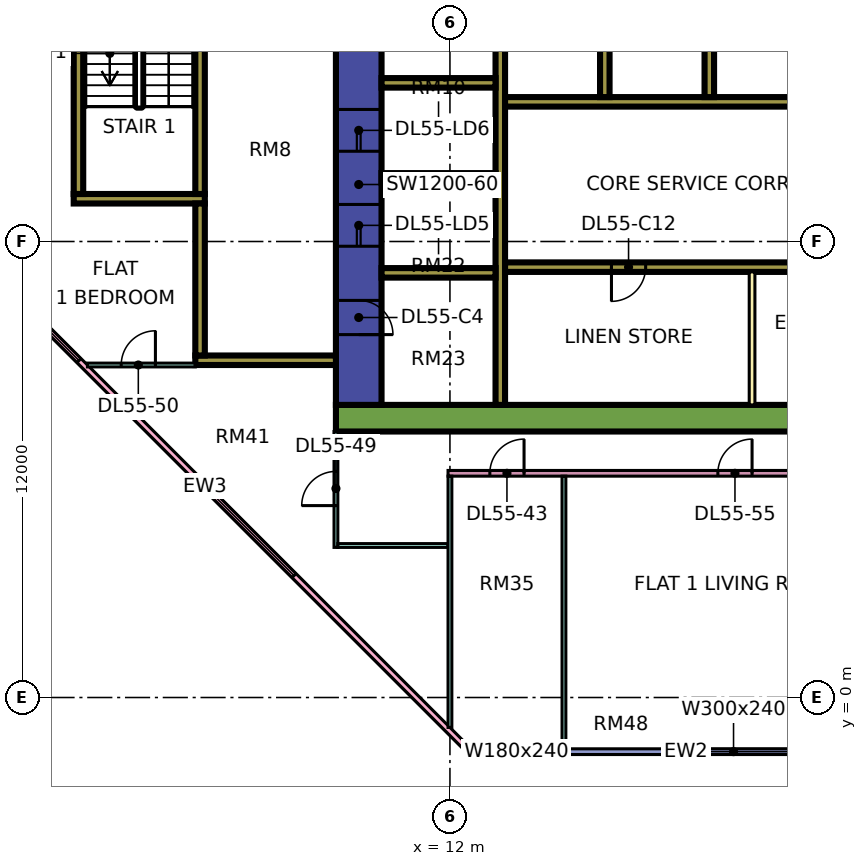
"""IFC4 building model, lengths in metres.
Left out: names, types, materials, properties, quantities, classifications, styles, units other than length and angle.
Written with IfcOpenShell. Run it as: python <this file> out.ifc"""

import sys

from ifc_helpers import new_model, si_unit, direction, frame, frame_2d, origin, place, context, subcontext, project, spatial, rectangle, extrude, element, fill, save


model = new_model("IFC4")
c1 = context("Model", 3, precision=1e-05, world=origin(), true_north=direction((0.0, 1.0)))
c2 = subcontext(c1, "Body", "Model", "MODEL_VIEW")
j1 = project(units=[si_unit("LENGTHUNIT", "METRE"), si_unit("PLANEANGLEUNIT", "RADIAN")], contexts=[c1])
p1 = place(None, origin())
s1 = spatial("IfcSite", under=j1, at=p1, CompositionType="ELEMENT")
p2 = place(p1, origin())
s2 = spatial("IfcBuilding", under=s1, at=p2, CompositionType="ELEMENT")
p3 = place(p2, frame((0.0, 0.0, 234.15)))
s3 = spatial("IfcBuildingStorey", under=s2, at=p3, CompositionType="ELEMENT", Elevation=234.15)
p4 = place(p3, frame((9.0, 7.35, 0.0), z_axis=(0.0, 0.0, 1.0), x_axis=(1.0, 0.0, 0.0)))
e1 = element("IfcWall", 1, at=p4, inside=s3, PredefinedType="SHEAR", context=c2, shape_type="SweptSolid", body=[
    extrude(rectangle(XDim=25.0, YDim=0.7, at=frame_2d((12.5, 0.0))), origin(), (0.0, 0.0, 1.0), 3.75),
])
p5 = place(p3, frame((9.6, 7.7, 0.0), z_axis=(0.0, 0.0, 1.0), x_axis=(0.0, 1.0, 0.0)))
e2 = element("IfcWall", 2, at=p5, inside=s3, PredefinedType="SHEAR", context=c2, shape_type="SweptSolid", body=[
    extrude(rectangle(XDim=11.6, YDim=1.2, at=frame_2d((5.8, 0.0))), origin(), (0.0, 0.0, 1.0), 3.75),
])
p6 = place(p5, frame((4.175, 0.0, 0.0)))
e3 = element("IfcOpeningElement", 3, at=p6, cuts=e2, PredefinedType="OPENING", context=c2, shape_type="SweptSolid", body=[
    extrude(rectangle(XDim=1.1, YDim=2.2, at=frame_2d((0.55, 1.1))), frame((0.0, 0.61, 0.0), z_axis=(0.0, -1.0, 0.0), x_axis=(1.0, 0.0, 0.0)), (0.0, 0.0, 1.0), 1.22),
])
p7 = place(p5, frame((6.675, 0.0, 0.0)))
e4 = element("IfcOpeningElement", 4, at=p7, cuts=e2, PredefinedType="OPENING", context=c2, shape_type="SweptSolid", body=[
    extrude(rectangle(XDim=1.1, YDim=2.2, at=frame_2d((0.55, 1.1))), frame((0.0, 0.61, 0.0), z_axis=(0.0, -1.0, 0.0), x_axis=(1.0, 0.0, 0.0)), (0.0, 0.0, 1.0), 1.22),
])
p8 = place(p5, frame((9.55, 0.0, 0.0)))
e5 = element("IfcOpeningElement", 5, at=p8, cuts=e2, PredefinedType="OPENING", context=c2, shape_type="SweptSolid", body=[
    extrude(rectangle(XDim=1.1, YDim=2.2, at=frame_2d((0.55, 1.1))), frame((0.0, 0.61, 0.0), z_axis=(0.0, -1.0, 0.0), x_axis=(1.0, 0.0, 0.0)), (0.0, 0.0, 1.0), 1.22),
])
p9 = place(p5, frame((1.85, 0.0, 0.0)))
e6 = element("IfcOpeningElement", 6, at=p9, cuts=e2, PredefinedType="OPENING", context=c2, shape_type="SweptSolid", body=[
    extrude(rectangle(XDim=0.9, YDim=2.1, at=frame_2d((0.45, 1.05))), frame((0.0, 0.61, 0.0), z_axis=(0.0, -1.0, 0.0), x_axis=(1.0, 0.0, 0.0)), (0.0, 0.0, 1.0), 1.22),
])
p10 = place(p3, frame((13.325, 7.7, 0.0), z_axis=(0.0, 0.0, 1.0), x_axis=(0.0, 1.0, 0.0)))
e7 = element("IfcWall", 7, at=p10, inside=s3, PredefinedType="SHEAR", context=c2, shape_type="SweptSolid", body=[
    extrude(rectangle(XDim=11.6, YDim=0.25, at=frame_2d((5.8, 0.0))), origin(), (0.0, 0.0, 1.0), 3.75),
])
p11 = place(p3, frame((13.45, 11.325, 0.0), z_axis=(0.0, 0.0, 1.0), x_axis=(1.0, 0.0, 0.0)))
e8 = element("IfcWall", 8, at=p11, inside=s3, PredefinedType="SHEAR", context=c2, shape_type="SweptSolid", body=[
    extrude(rectangle(XDim=19.85, YDim=0.25, at=frame_2d((9.925, 0.0))), origin(), (0.0, 0.0, 1.0), 3.75),
])
p12 = place(p11, frame((11.65, 0.0, 0.0)))
e9 = element("IfcOpeningElement", 9, at=p12, cuts=e8, PredefinedType="OPENING", context=c2, shape_type="SweptSolid", body=[
    extrude(rectangle(XDim=1.2, YDim=2.2, at=frame_2d((0.6, 1.1))), frame((0.0, 0.135, 0.0), z_axis=(0.0, -1.0, 0.0), x_axis=(1.0, 0.0, 0.0)), (0.0, 0.0, 1.0), 0.27),
])
p13 = place(p11, frame((14.4, 0.0, 0.0)))
e10 = element("IfcOpeningElement", 10, at=p13, cuts=e8, PredefinedType="OPENING", context=c2, shape_type="SweptSolid", body=[
    extrude(rectangle(XDim=1.2, YDim=2.2, at=frame_2d((0.6, 1.1))), frame((0.0, 0.135, 0.0), z_axis=(0.0, -1.0, 0.0), x_axis=(1.0, 0.0, 0.0)), (0.0, 0.0, 1.0), 0.27),
])
p14 = place(p11, frame((17.15, 0.0, 0.0)))
e11 = element("IfcOpeningElement", 11, at=p14, cuts=e8, PredefinedType="OPENING", context=c2, shape_type="SweptSolid", body=[
    extrude(rectangle(XDim=1.2, YDim=2.2, at=frame_2d((0.6, 1.1))), frame((0.0, 0.135, 0.0), z_axis=(0.0, -1.0, 0.0), x_axis=(1.0, 0.0, 0.0)), (0.0, 0.0, 1.0), 0.27),
])
p15 = place(p11, frame((2.8, 0.0, 0.0)))
e12 = element("IfcOpeningElement", 12, at=p15, cuts=e8, PredefinedType="OPENING", context=c2, shape_type="SweptSolid", body=[
    extrude(rectangle(XDim=0.9, YDim=2.1, at=frame_2d((0.45, 1.05))), frame((0.0, 0.135, 0.0), z_axis=(0.0, -1.0, 0.0), x_axis=(1.0, 0.0, 0.0)), (0.0, 0.0, 1.0), 0.27),
])
p16 = place(p11, frame((8.175, 0.0, 0.0)))
e13 = element("IfcOpeningElement", 13, at=p16, cuts=e8, PredefinedType="OPENING", context=c2, shape_type="SweptSolid", body=[
    extrude(rectangle(XDim=0.9, YDim=2.1, at=frame_2d((0.45, 1.05))), frame((0.0, 0.135, 0.0), z_axis=(0.0, -1.0, 0.0), x_axis=(1.0, 0.0, 0.0)), (0.0, 0.0, 1.0), 0.27),
])
p17 = place(p3, frame((13.45, 15.675, 0.0), z_axis=(0.0, 0.0, 1.0), x_axis=(1.0, 0.0, 0.0)))
e14 = element("IfcWall", 14, at=p17, inside=s3, PredefinedType="SHEAR", context=c2, shape_type="SweptSolid", body=[
    extrude(rectangle(XDim=13.75, YDim=0.25, at=frame_2d((6.875, 0.0))), origin(), (0.0, 0.0, 1.0), 3.75),
])
p18 = place(p17, frame((11.65, 0.0, 0.0)))
e15 = element("IfcOpeningElement", 15, at=p18, cuts=e14, PredefinedType="OPENING", context=c2, shape_type="SweptSolid", body=[
    extrude(rectangle(XDim=1.2, YDim=2.2, at=frame_2d((0.6, 1.1))), frame((0.0, 0.135, 0.0), z_axis=(0.0, -1.0, 0.0), x_axis=(1.0, 0.0, 0.0)), (0.0, 0.0, 1.0), 0.27),
])
for number, where, z_axis, x_axis in (
    (16, (10.2, 11.175, 0.0), (0.0, 0.0, 1.0), (1.0, 0.0, 0.0)),
    (17, (10.2, 13.675, 0.0), (0.0, 0.0, 1.0), (1.0, 0.0, 0.0)),
    (18, (10.2, 16.175, 0.0), (0.0, 0.0, 1.0), (1.0, 0.0, 0.0)),
):
    element("IfcWall", number, at=place(p3, frame(where, z_axis=z_axis, x_axis=x_axis)), inside=s3, PredefinedType="SHEAR", context=c2, shape_type="SweptSolid", body=[
        extrude(rectangle(XDim=3.0, YDim=0.25, at=frame_2d((1.5, 0.0))), origin(), (0.0, 0.0, 1.0), 3.75),
    ])
for number, where, z_axis, x_axis in (
    (19, (16.075, 15.8, 0.0), (0.0, 0.0, 1.0), (0.0, 1.0, 0.0)),
    (20, (18.825, 15.8, 0.0), (0.0, 0.0, 1.0), (0.0, 1.0, 0.0)),
):
    element("IfcWall", number, at=place(p3, frame(where, z_axis=z_axis, x_axis=x_axis)), inside=s3, PredefinedType="SHEAR", context=c2, shape_type="SweptSolid", body=[
        extrude(rectangle(XDim=3.5, YDim=0.25, at=frame_2d((1.75, 0.0))), origin(), (0.0, 0.0, 1.0), 3.75),
    ])
p19 = place(p3, frame((2.1, 13.125, 0.0), z_axis=(0.0, 0.0, 1.0), x_axis=(1.0, 0.0, 0.0)))
e21 = element("IfcWall", 21, at=p19, inside=s3, PredefinedType="SHEAR", context=c2, shape_type="SweptSolid", body=[
    extrude(rectangle(XDim=3.45, YDim=0.25, at=frame_2d((1.725, 0.0))), origin(), (0.0, 0.0, 1.0), 3.75),
])
p20 = place(p3, frame((2.225, 13.25, 0.0), z_axis=(0.0, 0.0, 1.0), x_axis=(0.0, 1.0, 0.0)))
e22 = element("IfcWall", 22, at=p20, inside=s3, PredefinedType="SHEAR", context=c2, shape_type="SweptSolid", body=[
    extrude(rectangle(XDim=6.5, YDim=0.25, at=frame_2d((3.25, 0.0))), origin(), (0.0, 0.0, 1.0), 3.75),
])
p21 = place(p3, frame((5.425, 13.25, 0.0), z_axis=(0.0, 0.0, 1.0), x_axis=(0.0, 1.0, 0.0)))
e23 = element("IfcWall", 23, at=p21, inside=s3, PredefinedType="SHEAR", context=c2, shape_type="SweptSolid", body=[
    extrude(rectangle(XDim=6.5, YDim=0.25, at=frame_2d((3.25, 0.0))), origin(), (0.0, 0.0, 1.0), 3.75),
])
p22 = place(p21, frame((5.25, 0.0, 0.0)))
e24 = element("IfcOpeningElement", 24, at=p22, cuts=e23, PredefinedType="OPENING", context=c2, shape_type="SweptSolid", body=[
    extrude(rectangle(XDim=1.1, YDim=2.2, at=frame_2d((0.55, 1.1))), frame((0.0, 0.135, 0.0), z_axis=(0.0, -1.0, 0.0), x_axis=(1.0, 0.0, 0.0)), (0.0, 0.0, 1.0), 0.27),
])
p23 = place(p3, frame((5.3, 8.875, 0.0), z_axis=(0.0, 0.0, 1.0), x_axis=(1.0, 0.0, 0.0)))
e25 = element("IfcWall", 25, at=p23, inside=s3, PredefinedType="SHEAR", context=c2, shape_type="SweptSolid", body=[
    extrude(rectangle(XDim=3.7, YDim=0.25, at=frame_2d((1.85, 0.0))), origin(), (0.0, 0.0, 1.0), 3.75),
])
p24 = place(p3, frame((5.425, 9.0, 0.0), z_axis=(0.0, 0.0, 1.0), x_axis=(0.0, 1.0, 0.0)))
e26 = element("IfcWall", 26, at=p24, inside=s3, PredefinedType="SHEAR", context=c2, shape_type="SweptSolid", body=[
    extrude(rectangle(XDim=4.0, YDim=0.25, at=frame_2d((2.0, 0.0))), origin(), (0.0, 0.0, 1.0), 3.75),
])
p25 = place(p3, frame((-1.447, 12.553, 0.0), z_axis=(0.0, 0.0, 1.0), x_axis=(0.707106781187, -0.707106781187, 0.0)))
e27 = element("IfcWall", 27, at=p25, inside=s3, PredefinedType="SOLIDWALL", context=c2, shape_type="SweptSolid", body=[
    extrude(rectangle(XDim=19.799, YDim=0.15, at=frame_2d((9.899, 0.0))), origin(), (0.0, 0.0, 1.0), 3.35),
])
p26 = place(p25, frame((2.212, 0.0, 0.45)))
e28 = element("IfcOpeningElement", 28, at=p26, cuts=e27, PredefinedType="OPENING", context=c2, shape_type="SweptSolid", body=[
    extrude(rectangle(XDim=3.0, YDim=2.4, at=frame_2d((1.5, 1.2))), frame((0.0, 0.085, 0.0), z_axis=(0.0, -1.0, 0.0), x_axis=(1.0, 0.0, 0.0)), (0.0, 0.0, 1.0), 0.17),
])
p27 = place(p25, frame((10.216, 0.0, 0.45)))
e29 = element("IfcOpeningElement", 29, at=p27, cuts=e27, PredefinedType="OPENING", context=c2, shape_type="SweptSolid", body=[
    extrude(rectangle(XDim=3.0, YDim=2.4, at=frame_2d((1.5, 1.2))), frame((0.0, 0.085, 0.0), z_axis=(0.0, -1.0, 0.0), x_axis=(1.0, 0.0, 0.0)), (0.0, 0.0, 1.0), 0.17),
])
p28 = place(p3, frame((12.5, -1.425, 0.0), z_axis=(0.0, 0.0, 1.0), x_axis=(1.0, 0.0, 0.0)))
e30 = element("IfcWall", 30, at=p28, inside=s3, PredefinedType="SOLIDWALL", context=c2, shape_type="SweptSolid", body=[
    extrude(rectangle(XDim=11.425, YDim=0.15, at=frame_2d((5.712, 0.0))), origin(), (0.0, 0.0, 1.0), 3.35),
])
p29 = place(p28, frame((0.35, 0.0, 0.45)))
e31 = element("IfcOpeningElement", 31, at=p29, cuts=e30, PredefinedType="OPENING", context=c2, shape_type="SweptSolid", body=[
    extrude(rectangle(XDim=1.8, YDim=2.4, at=frame_2d((0.9, 1.2))), frame((0.0, 0.085, 0.0), z_axis=(0.0, -1.0, 0.0), x_axis=(1.0, 0.0, 0.0)), (0.0, 0.0, 1.0), 0.17),
])
p30 = place(p28, frame((5.462, 0.0, 0.45)))
e32 = element("IfcOpeningElement", 32, at=p30, cuts=e30, PredefinedType="OPENING", context=c2, shape_type="SweptSolid", body=[
    extrude(rectangle(XDim=3.0, YDim=2.4, at=frame_2d((1.5, 1.2))), frame((0.0, 0.085, 0.0), z_axis=(0.0, -1.0, 0.0), x_axis=(1.0, 0.0, 0.0)), (0.0, 0.0, 1.0), 0.17),
])
p31 = place(p3, frame((19.95, 7.7, 0.0), z_axis=(0.0, 0.0, 1.0), x_axis=(0.0, 1.0, 0.0)))
e33 = element("IfcWall", 33, at=p31, inside=s3, PredefinedType="PARTITIONING", context=c2, shape_type="SweptSolid", body=[
    extrude(rectangle(XDim=3.5, YDim=0.15, at=frame_2d((1.75, 0.0))), origin(), (0.0, 0.0, 1.0), 3.35),
])
p32 = place(p3, frame((2.461, 8.75, 0.0), z_axis=(0.0, 0.0, 1.0), x_axis=(1.0, 0.0, 0.0)))
e34 = element("IfcWall", 34, at=p32, inside=s3, PredefinedType="PARTITIONING", context=c2, shape_type="SweptSolid", body=[
    extrude(rectangle(XDim=2.839, YDim=0.1, at=frame_2d((1.419, 0.0))), origin(), (0.0, 0.0, 1.0), 3.35),
])
p33 = place(p32, frame((0.889, 0.0, 0.0)))
e35 = element("IfcOpeningElement", 35, at=p33, cuts=e34, PredefinedType="OPENING", context=c2, shape_type="SweptSolid", body=[
    extrude(rectangle(XDim=0.9, YDim=2.1, at=frame_2d((0.45, 1.05))), frame((0.0, 0.06, 0.0), z_axis=(0.0, -1.0, 0.0), x_axis=(1.0, 0.0, 0.0)), (0.0, 0.0, 1.0), 0.12),
])
p34 = place(p3, frame((9.0, 3.95, 0.0), z_axis=(0.0, 0.0, 1.0), x_axis=(0.0, 1.0, 0.0)))
e36 = element("IfcWall", 36, at=p34, inside=s3, PredefinedType="PARTITIONING", context=c2, shape_type="SweptSolid", body=[
    extrude(rectangle(XDim=3.05, YDim=0.1, at=frame_2d((1.525, 0.0))), origin(), (0.0, 0.0, 1.0), 3.35),
])
p35 = place(p34, frame((1.1, 0.0, 0.0)))
e37 = element("IfcOpeningElement", 37, at=p35, cuts=e36, PredefinedType="OPENING", context=c2, shape_type="SweptSolid", body=[
    extrude(rectangle(XDim=0.9, YDim=2.1, at=frame_2d((0.45, 1.05))), frame((0.0, 0.06, 0.0), z_axis=(0.0, -1.0, 0.0), x_axis=(1.0, 0.0, 0.0)), (0.0, 0.0, 1.0), 0.12),
])
p36 = place(p3, frame((9.05, 4.0, 0.0), z_axis=(0.0, 0.0, 1.0), x_axis=(1.0, 0.0, 0.0)))
e38 = element("IfcWall", 38, at=p36, inside=s3, PredefinedType="PARTITIONING", context=c2, shape_type="SweptSolid", body=[
    extrude(rectangle(XDim=2.9, YDim=0.1, at=frame_2d((1.45, 0.0))), origin(), (0.0, 0.0, 1.0), 3.35),
])
p37 = place(p3, frame((11.95, 5.9, 0.0), z_axis=(0.0, 0.0, 1.0), x_axis=(1.0, 0.0, 0.0)))
e39 = element("IfcWall", 39, at=p37, inside=s3, PredefinedType="PARTITIONING", context=c2, shape_type="SweptSolid", body=[
    extrude(rectangle(XDim=21.1, YDim=0.15, at=frame_2d((10.55, 0.0))), origin(), (0.0, 0.0, 1.0), 3.35),
])
p38 = place(p37, frame((1.1, 0.0, 0.0)))
e40 = element("IfcOpeningElement", 40, at=p38, cuts=e39, PredefinedType="OPENING", context=c2, shape_type="SweptSolid", body=[
    extrude(rectangle(XDim=0.9, YDim=2.1, at=frame_2d((0.45, 1.05))), frame((0.0, 0.085, 0.0), z_axis=(0.0, -1.0, 0.0), x_axis=(1.0, 0.0, 0.0)), (0.0, 0.0, 1.0), 0.17),
])
p39 = place(p37, frame((13.1, 0.0, 0.0)))
e41 = element("IfcOpeningElement", 41, at=p39, cuts=e39, PredefinedType="OPENING", context=c2, shape_type="SweptSolid", body=[
    extrude(rectangle(XDim=0.9, YDim=2.1, at=frame_2d((0.45, 1.05))), frame((0.0, 0.085, 0.0), z_axis=(0.0, -1.0, 0.0), x_axis=(1.0, 0.0, 0.0)), (0.0, 0.0, 1.0), 0.17),
])
p40 = place(p37, frame((7.1, 0.0, 0.0)))
e42 = element("IfcOpeningElement", 42, at=p40, cuts=e39, PredefinedType="OPENING", context=c2, shape_type="SweptSolid", body=[
    extrude(rectangle(XDim=0.9, YDim=2.1, at=frame_2d((0.45, 1.05))), frame((0.0, 0.085, 0.0), z_axis=(0.0, -1.0, 0.0), x_axis=(1.0, 0.0, 0.0)), (0.0, 0.0, 1.0), 0.17),
])
p41 = place(p3, frame((12.0, -0.788, 0.0), z_axis=(0.0, 0.0, 1.0), x_axis=(0.0, 1.0, 0.0)))
e43 = element("IfcWall", 43, at=p41, inside=s3, PredefinedType="PARTITIONING", context=c2, shape_type="SweptSolid", body=[
    extrude(rectangle(XDim=6.613, YDim=0.1, at=frame_2d((3.306, 0.0))), origin(), (0.0, 0.0, 1.0), 3.35),
])
p42 = place(p3, frame((15.0, -1.35, 0.0), z_axis=(0.0, 0.0, 1.0), x_axis=(0.0, 1.0, 0.0)))
e44 = element("IfcWall", 44, at=p42, inside=s3, PredefinedType="PARTITIONING", context=c2, shape_type="SweptSolid", body=[
    extrude(rectangle(XDim=7.175, YDim=0.1, at=frame_2d((3.587, 0.0))), origin(), (0.0, 0.0, 1.0), 3.35),
])
p43 = place(p26, origin())
e45 = element("IfcWindow", 45, at=p43, inside=s3, PartitioningType="SINGLE_PANEL", PredefinedType="WINDOW", context=c2, shape_type="SweptSolid", body=[
    extrude(rectangle(XDim=3.0, YDim=2.4, at=frame_2d((1.5, 1.2))), frame((0.0, 0.03, 0.0), z_axis=(0.0, -1.0, 0.0), x_axis=(1.0, 0.0, 0.0)), (0.0, 0.0, 1.0), 0.06),
])
fill(e28, e45)
p44 = place(p27, origin())
e46 = element("IfcWindow", 46, at=p44, inside=s3, PartitioningType="SINGLE_PANEL", PredefinedType="WINDOW", context=c2, shape_type="SweptSolid", body=[
    extrude(rectangle(XDim=3.0, YDim=2.4, at=frame_2d((1.5, 1.2))), frame((0.0, 0.03, 0.0), z_axis=(0.0, -1.0, 0.0), x_axis=(1.0, 0.0, 0.0)), (0.0, 0.0, 1.0), 0.06),
])
fill(e29, e46)
p45 = place(p29, origin())
e47 = element("IfcWindow", 47, at=p45, inside=s3, PartitioningType="SINGLE_PANEL", PredefinedType="WINDOW", context=c2, shape_type="SweptSolid", body=[
    extrude(rectangle(XDim=1.8, YDim=2.4, at=frame_2d((0.9, 1.2))), frame((0.0, 0.03, 0.0), z_axis=(0.0, -1.0, 0.0), x_axis=(1.0, 0.0, 0.0)), (0.0, 0.0, 1.0), 0.06),
])
fill(e31, e47)
p46 = place(p30, origin())
e48 = element("IfcWindow", 48, at=p46, inside=s3, PartitioningType="SINGLE_PANEL", PredefinedType="WINDOW", context=c2, shape_type="SweptSolid", body=[
    extrude(rectangle(XDim=3.0, YDim=2.4, at=frame_2d((1.5, 1.2))), frame((0.0, 0.03, 0.0), z_axis=(0.0, -1.0, 0.0), x_axis=(1.0, 0.0, 0.0)), (0.0, 0.0, 1.0), 0.06),
])
fill(e32, e48)
p47 = place(p6, origin())
e49 = element("IfcDoor", 49, at=p47, inside=s3, OperationType="DOUBLE_DOOR_SLIDING", PredefinedType="DOOR", context=c2, shape_type="SweptSolid", body=[
    extrude(rectangle(XDim=1.1, YDim=2.2, at=frame_2d((0.55, 1.1))), frame((0.0, 0.025, 0.0), z_axis=(0.0, -1.0, 0.0), x_axis=(1.0, 0.0, 0.0)), (0.0, 0.0, 1.0), 0.05),
])
fill(e3, e49)
p48 = place(p7, origin())
e50 = element("IfcDoor", 50, at=p48, inside=s3, OperationType="DOUBLE_DOOR_SLIDING", PredefinedType="DOOR", context=c2, shape_type="SweptSolid", body=[
    extrude(rectangle(XDim=1.1, YDim=2.2, at=frame_2d((0.55, 1.1))), frame((0.0, 0.025, 0.0), z_axis=(0.0, -1.0, 0.0), x_axis=(1.0, 0.0, 0.0)), (0.0, 0.0, 1.0), 0.05),
])
fill(e4, e50)
p49 = place(p9, frame((0.9, 0.0, 0.0), z_axis=(0.0, 0.0, 1.0), x_axis=(-1.0, 0.0, 0.0)))
e51 = element("IfcDoor", 51, at=p49, inside=s3, OperationType="SINGLE_SWING_LEFT", PredefinedType="DOOR", context=c2, shape_type="SweptSolid", body=[
    extrude(rectangle(XDim=0.9, YDim=2.1, at=frame_2d((0.45, 1.05))), frame((0.0, 0.025, 0.0), z_axis=(0.0, -1.0, 0.0), x_axis=(1.0, 0.0, 0.0)), (0.0, 0.0, 1.0), 0.05),
])
fill(e6, e51)
p50 = place(p15, frame((0.9, 0.0, 0.0), z_axis=(0.0, 0.0, 1.0), x_axis=(-1.0, 0.0, 0.0)))
e52 = element("IfcDoor", 52, at=p50, inside=s3, OperationType="SINGLE_SWING_LEFT", PredefinedType="DOOR", context=c2, shape_type="SweptSolid", body=[
    extrude(rectangle(XDim=0.9, YDim=2.1, at=frame_2d((0.45, 1.05))), frame((0.0, 0.025, 0.0), z_axis=(0.0, -1.0, 0.0), x_axis=(1.0, 0.0, 0.0)), (0.0, 0.0, 1.0), 0.05),
])
fill(e12, e52)
p51 = place(p38, frame((0.9, 0.0, 0.0), z_axis=(0.0, 0.0, 1.0), x_axis=(-1.0, 0.0, 0.0)))
e53 = element("IfcDoor", 53, at=p51, inside=s3, OperationType="SINGLE_SWING_RIGHT", PredefinedType="DOOR", context=c2, shape_type="SweptSolid", body=[
    extrude(rectangle(XDim=0.9, YDim=2.1, at=frame_2d((0.45, 1.05))), frame((0.0, 0.025, 0.0), z_axis=(0.0, -1.0, 0.0), x_axis=(1.0, 0.0, 0.0)), (0.0, 0.0, 1.0), 0.05),
])
fill(e40, e53)
p52 = place(p35, origin())
e54 = element("IfcDoor", 54, at=p52, inside=s3, OperationType="SINGLE_SWING_LEFT", PredefinedType="DOOR", context=c2, shape_type="SweptSolid", body=[
    extrude(rectangle(XDim=0.9, YDim=2.1, at=frame_2d((0.45, 1.05))), frame((0.0, 0.025, 0.0), z_axis=(0.0, -1.0, 0.0), x_axis=(1.0, 0.0, 0.0)), (0.0, 0.0, 1.0), 0.05),
])
fill(e37, e54)
p53 = place(p33, frame((0.9, 0.0, 0.0), z_axis=(0.0, 0.0, 1.0), x_axis=(-1.0, 0.0, 0.0)))
e55 = element("IfcDoor", 55, at=p53, inside=s3, OperationType="SINGLE_SWING_RIGHT", PredefinedType="DOOR", context=c2, shape_type="SweptSolid", body=[
    extrude(rectangle(XDim=0.9, YDim=2.1, at=frame_2d((0.45, 1.05))), frame((0.0, 0.025, 0.0), z_axis=(0.0, -1.0, 0.0), x_axis=(1.0, 0.0, 0.0)), (0.0, 0.0, 1.0), 0.05),
])
fill(e35, e55)
p54 = place(p40, frame((0.9, 0.0, 0.0), z_axis=(0.0, 0.0, 1.0), x_axis=(-1.0, 0.0, 0.0)))
e56 = element("IfcDoor", 56, at=p54, inside=s3, OperationType="SINGLE_SWING_RIGHT", PredefinedType="DOOR", context=c2, shape_type="SweptSolid", body=[
    extrude(rectangle(XDim=0.9, YDim=2.1, at=frame_2d((0.45, 1.05))), frame((0.0, 0.025, 0.0), z_axis=(0.0, -1.0, 0.0), x_axis=(1.0, 0.0, 0.0)), (0.0, 0.0, 1.0), 0.05),
])
fill(e42, e56)
save(model, sys.argv[1])
